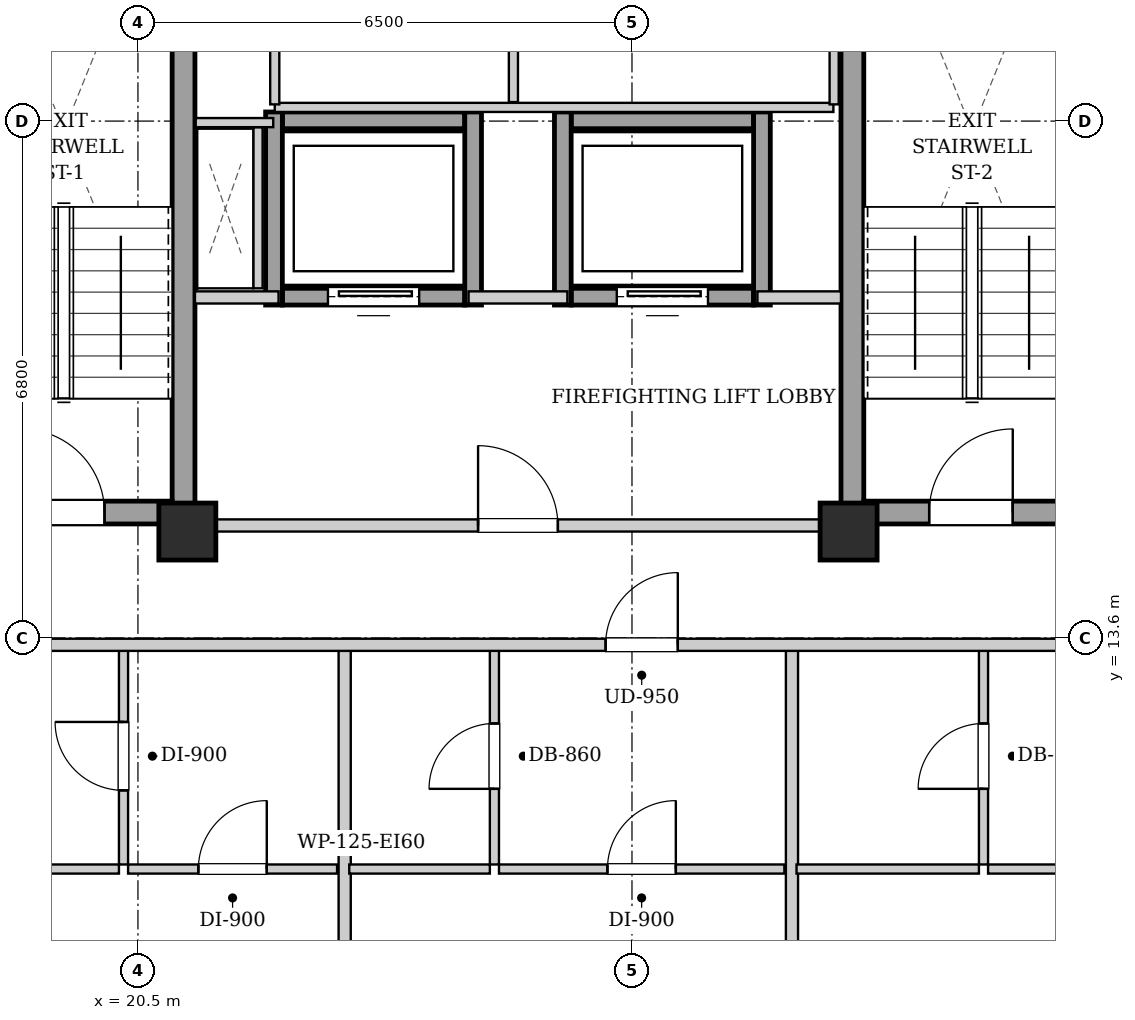
"""IFC4 building model, lengths in metres.
Left out: names, types, materials, properties, quantities, classifications, styles, units other than length and angle.
Written with IfcOpenShell. Run it as: python <this file> out.ifc"""

import sys

from ifc_helpers import new_model, si_unit, direction, frame, frame_2d, origin, origin_2d, place, context, subcontext, project, spatial, rectangle, extrude, element, fill, save


model = new_model("IFC4")
c1 = context("Model", 3, precision=1e-05, world=origin(), true_north=direction((0.0, 1.0)))
c2 = subcontext(c1, "Body", "Model", "MODEL_VIEW")
j1 = project(units=[si_unit("LENGTHUNIT", "METRE"), si_unit("PLANEANGLEUNIT", "RADIAN")], contexts=[c1])
p1 = place(None, origin())
s1 = spatial("IfcSite", under=j1, at=p1, CompositionType="ELEMENT")
p2 = place(p1, origin())
s2 = spatial("IfcBuilding", under=s1, at=p2, CompositionType="ELEMENT")
p3 = place(p2, frame((0.0, 0.0, 234.3)))
s3 = spatial("IfcBuildingStorey", under=s2, at=p3, CompositionType="ELEMENT", Elevation=234.3)
for number, where, z_axis, x_axis in (
    (1, (21.15, 15.0, 0.0), (0.0, 0.0, 1.0), (1.0, 0.0, 0.0)),
    (2, (29.85, 15.0, 0.0), (0.0, 0.0, 1.0), (1.0, 0.0, 0.0)),
):
    element("IfcColumn", number, at=place(p3, frame(where, z_axis=z_axis, x_axis=x_axis)), inside=s3, PredefinedType="COLUMN", context=c2, shape_type="SweptSolid", body=[
        extrude(rectangle(XDim=0.75, YDim=0.75, at=origin_2d()), origin(), (0.0, 0.0, 1.0), 3.4),
    ])
p4 = place(p3, frame((21.1, 15.1, 0.0), z_axis=(0.0, 0.0, 1.0), x_axis=(0.0, 1.0, 0.0)))
e3 = element("IfcWall", 3, at=p4, inside=s3, PredefinedType="SHEAR", context=c2, shape_type="SweptSolid", body=[
    extrude(rectangle(XDim=9.0, YDim=0.3, at=frame_2d((4.5, 0.0))), origin(), (0.0, 0.0, 1.0), 3.14),
])
p5 = place(p3, frame((18.1, 15.25, 0.0), z_axis=(0.0, 0.0, 1.0), x_axis=(1.0, 0.0, 0.0)))
e4 = element("IfcWall", 4, at=p5, inside=s3, PredefinedType="SHEAR", context=c2, shape_type="SweptSolid", body=[
    extrude(rectangle(XDim=2.85, YDim=0.3, at=frame_2d((1.425, 0.0))), origin(), (0.0, 0.0, 1.0), 3.14),
])
p6 = place(p5, frame((0.86, 0.0, 0.0)))
e5 = element("IfcOpeningElement", 5, at=p6, cuts=e4, PredefinedType="OPENING", context=c2, shape_type="SweptSolid", body=[
    extrude(rectangle(XDim=1.1, YDim=2.05, at=frame_2d((0.55, 1.025))), frame((0.0, 0.16, 0.0), z_axis=(0.0, -1.0, 0.0), x_axis=(1.0, 0.0, 0.0)), (0.0, 0.0, 1.0), 0.32),
])
p7 = place(p3, frame((29.9, 15.1, 0.0), z_axis=(0.0, 0.0, 1.0), x_axis=(0.0, 1.0, 0.0)))
e6 = element("IfcWall", 6, at=p7, inside=s3, PredefinedType="SHEAR", context=c2, shape_type="SweptSolid", body=[
    extrude(rectangle(XDim=9.0, YDim=0.3, at=frame_2d((4.5, 0.0))), origin(), (0.0, 0.0, 1.0), 3.14),
])
p8 = place(p3, frame((30.05, 15.25, 0.0), z_axis=(0.0, 0.0, 1.0), x_axis=(1.0, 0.0, 0.0)))
e7 = element("IfcWall", 7, at=p8, inside=s3, PredefinedType="SHEAR", context=c2, shape_type="SweptSolid", body=[
    extrude(rectangle(XDim=2.85, YDim=0.3, at=frame_2d((1.425, 0.0))), origin(), (0.0, 0.0, 1.0), 3.14),
])
p9 = place(p8, frame((0.86, 0.0, 0.0)))
e8 = element("IfcOpeningElement", 8, at=p9, cuts=e7, PredefinedType="OPENING", context=c2, shape_type="SweptSolid", body=[
    extrude(rectangle(XDim=1.1, YDim=2.05, at=frame_2d((0.55, 1.025))), frame((0.0, 0.16, 0.0), z_axis=(0.0, -1.0, 0.0), x_axis=(1.0, 0.0, 0.0)), (0.0, 0.0, 1.0), 0.32),
])
p10 = place(p3, frame((22.4, 18.09, 0.0), z_axis=(0.0, 0.0, 1.0), x_axis=(1.0, 0.0, 0.0)))
e9 = element("IfcWall", 9, at=p10, inside=s3, PredefinedType="SHEAR", context=c2, shape_type="SweptSolid", body=[
    extrude(rectangle(XDim=2.4, YDim=0.22, at=frame_2d((1.2, 0.0))), origin(), (0.0, 0.0, 1.0), 3.14),
])
p11 = place(p10, frame((0.6, 0.0, 0.0)))
e10 = element("IfcOpeningElement", 10, at=p11, cuts=e9, PredefinedType="OPENING", context=c2, shape_type="SweptSolid", body=[
    extrude(rectangle(XDim=1.2, YDim=2.15, at=frame_2d((0.6, 1.075))), frame((0.0, 0.12, 0.0), z_axis=(0.0, -1.0, 0.0), x_axis=(1.0, 0.0, 0.0)), (0.0, 0.0, 1.0), 0.24),
])
p12 = place(p3, frame((22.4, 20.41, 0.0), z_axis=(0.0, 0.0, 1.0), x_axis=(1.0, 0.0, 0.0)))
e11 = element("IfcWall", 11, at=p12, inside=s3, PredefinedType="SHEAR", context=c2, shape_type="SweptSolid", body=[
    extrude(rectangle(XDim=2.4, YDim=0.22, at=frame_2d((1.2, 0.0))), origin(), (0.0, 0.0, 1.0), 3.14),
])
for number, where, z_axis, x_axis in (
    (12, (22.29, 17.98, 0.0), (0.0, 0.0, 1.0), (0.0, 1.0, 0.0)),
    (13, (24.91, 17.98, 0.0), (0.0, 0.0, 1.0), (0.0, 1.0, 0.0)),
):
    element("IfcWall", number, at=place(p3, frame(where, z_axis=z_axis, x_axis=x_axis)), inside=s3, PredefinedType="SHEAR", context=c2, shape_type="SweptSolid", body=[
        extrude(rectangle(XDim=2.54, YDim=0.22, at=frame_2d((1.27, 0.0))), origin(), (0.0, 0.0, 1.0), 3.14),
    ])
p13 = place(p3, frame((26.2, 18.09, 0.0), z_axis=(0.0, 0.0, 1.0), x_axis=(1.0, 0.0, 0.0)))
e14 = element("IfcWall", 14, at=p13, inside=s3, PredefinedType="SHEAR", context=c2, shape_type="SweptSolid", body=[
    extrude(rectangle(XDim=2.4, YDim=0.22, at=frame_2d((1.2, 0.0))), origin(), (0.0, 0.0, 1.0), 3.14),
])
p14 = place(p13, frame((0.6, 0.0, 0.0)))
e15 = element("IfcOpeningElement", 15, at=p14, cuts=e14, PredefinedType="OPENING", context=c2, shape_type="SweptSolid", body=[
    extrude(rectangle(XDim=1.2, YDim=2.15, at=frame_2d((0.6, 1.075))), frame((0.0, 0.12, 0.0), z_axis=(0.0, -1.0, 0.0), x_axis=(1.0, 0.0, 0.0)), (0.0, 0.0, 1.0), 0.24),
])
p15 = place(p3, frame((26.2, 20.41, 0.0), z_axis=(0.0, 0.0, 1.0), x_axis=(1.0, 0.0, 0.0)))
e16 = element("IfcWall", 16, at=p15, inside=s3, PredefinedType="SHEAR", context=c2, shape_type="SweptSolid", body=[
    extrude(rectangle(XDim=2.4, YDim=0.22, at=frame_2d((1.2, 0.0))), origin(), (0.0, 0.0, 1.0), 3.14),
])
for number, where, z_axis, x_axis in (
    (17, (26.09, 17.98, 0.0), (0.0, 0.0, 1.0), (0.0, 1.0, 0.0)),
    (18, (28.71, 17.98, 0.0), (0.0, 0.0, 1.0), (0.0, 1.0, 0.0)),
):
    element("IfcWall", number, at=place(p3, frame(where, z_axis=z_axis, x_axis=x_axis)), inside=s3, PredefinedType="SHEAR", context=c2, shape_type="SweptSolid", body=[
        extrude(rectangle(XDim=2.54, YDim=0.22, at=frame_2d((1.27, 0.0))), origin(), (0.0, 0.0, 1.0), 3.14),
    ])
p16 = place(p3, frame((21.25, 15.08, 0.0), z_axis=(0.0, 0.0, 1.0), x_axis=(1.0, 0.0, 0.0)))
e19 = element("IfcWall", 19, at=p16, inside=s3, PredefinedType="PARTITIONING", context=c2, shape_type="SweptSolid", body=[
    extrude(rectangle(XDim=8.5, YDim=0.16, at=frame_2d((4.25, 0.0))), origin(), (0.0, 0.0, 1.0), 2.668),
])
p17 = place(p16, frame((3.725, 0.0, 0.0)))
e20 = element("IfcOpeningElement", 20, at=p17, cuts=e19, PredefinedType="OPENING", context=c2, shape_type="SweptSolid", body=[
    extrude(rectangle(XDim=1.05, YDim=2.05, at=frame_2d((0.525, 1.025))), frame((0.0, 0.09, 0.0), z_axis=(0.0, -1.0, 0.0), x_axis=(1.0, 0.0, 0.0)), (0.0, 0.0, 1.0), 0.18),
])
p18 = place(p3, frame((21.25, 18.08, 0.0), z_axis=(0.0, 0.0, 1.0), x_axis=(1.0, 0.0, 0.0)))
e21 = element("IfcWall", 21, at=p18, inside=s3, PredefinedType="PARTITIONING", context=c2, shape_type="SweptSolid", body=[
    extrude(rectangle(XDim=1.1, YDim=0.16, at=frame_2d((0.55, 0.0))), origin(), (0.0, 0.0, 1.0), 3.14),
])
p19 = place(p3, frame((24.85, 18.08, 0.0), z_axis=(0.0, 0.0, 1.0), x_axis=(1.0, 0.0, 0.0)))
e22 = element("IfcWall", 22, at=p19, inside=s3, PredefinedType="PARTITIONING", context=c2, shape_type="SweptSolid", body=[
    extrude(rectangle(XDim=1.3, YDim=0.16, at=frame_2d((0.65, 0.0))), origin(), (0.0, 0.0, 1.0), 3.14),
])
p20 = place(p3, frame((28.65, 18.08, 0.0), z_axis=(0.0, 0.0, 1.0), x_axis=(1.0, 0.0, 0.0)))
e23 = element("IfcWall", 23, at=p20, inside=s3, PredefinedType="PARTITIONING", context=c2, shape_type="SweptSolid", body=[
    extrude(rectangle(XDim=1.1, YDim=0.16, at=frame_2d((0.55, 0.0))), origin(), (0.0, 0.0, 1.0), 3.14),
])
p21 = place(p3, frame((22.08, 18.2, 0.0), z_axis=(0.0, 0.0, 1.0), x_axis=(0.0, 1.0, 0.0)))
e24 = element("IfcWall", 24, at=p21, inside=s3, PredefinedType="PARTITIONING", context=c2, shape_type="SweptSolid", body=[
    extrude(rectangle(XDim=2.12, YDim=0.12, at=frame_2d((1.06, 0.0))), origin(), (0.0, 0.0, 1.0), 3.14),
])
p22 = place(p3, frame((22.28, 20.38, 0.0), z_axis=(0.0, 0.0, 1.0), x_axis=(-1.0, 0.0, 0.0)))
e25 = element("IfcWall", 25, at=p22, inside=s3, PredefinedType="PARTITIONING", context=c2, shape_type="SweptSolid", body=[
    extrude(rectangle(XDim=1.02, YDim=0.12, at=frame_2d((0.51, 0.0))), origin(), (0.0, 0.0, 1.0), 3.14),
])
p23 = place(p3, frame((22.3, 20.58, 0.0), z_axis=(0.0, 0.0, 1.0), x_axis=(1.0, 0.0, 0.0)))
e26 = element("IfcWall", 26, at=p23, inside=s3, PredefinedType="PARTITIONING", context=c2, shape_type="SweptSolid", body=[
    extrude(rectangle(XDim=7.35, YDim=0.12, at=frame_2d((3.675, 0.0))), origin(), (0.0, 0.0, 1.0), 3.14),
])
for number, where, z_axis, x_axis in (
    (27, (22.3, 20.62, 0.0), (0.0, 0.0, 1.0), (0.0, 1.0, 0.0)),
    (28, (29.66, 20.62, 0.0), (0.0, 0.0, 1.0), (0.0, 1.0, 0.0)),
):
    element("IfcWall", number, at=place(p3, frame(where, z_axis=z_axis, x_axis=x_axis)), inside=s3, PredefinedType="PARTITIONING", context=c2, shape_type="SweptSolid", body=[
        extrude(rectangle(XDim=2.06, YDim=0.12, at=frame_2d((1.03, 0.0))), origin(), (0.0, 0.0, 1.0), 3.14),
    ])
p24 = place(p3, frame((25.44, 20.65, 0.0), z_axis=(0.0, 0.0, 1.0), x_axis=(0.0, 1.0, 0.0)))
e29 = element("IfcWall", 29, at=p24, inside=s3, PredefinedType="PARTITIONING", context=c2, shape_type="SweptSolid", body=[
    extrude(rectangle(XDim=2.0, YDim=0.12, at=frame_2d((1.0, 0.0))), origin(), (0.0, 0.0, 1.0), 3.14),
])
p25 = place(p3, frame((20.31, 10.62, 0.0), z_axis=(0.0, 0.0, 1.0), x_axis=(0.0, 1.0, 0.0)))
e30 = element("IfcWall", 30, at=p25, inside=s3, PredefinedType="PARTITIONING", context=c2, shape_type="SweptSolid", body=[
    extrude(rectangle(XDim=2.85, YDim=0.12, at=frame_2d((1.425, 0.0))), origin(), (0.0, 0.0, 1.0), 3.14),
])
p26 = place(p25, frame((0.975, 0.0, 0.0)))
e31 = element("IfcOpeningElement", 31, at=p26, cuts=e30, PredefinedType="OPENING", context=c2, shape_type="SweptSolid", body=[
    extrude(rectangle(XDim=0.9, YDim=2.05, at=frame_2d((0.45, 1.025))), frame((0.0, 0.07, 0.0), z_axis=(0.0, -1.0, 0.0), x_axis=(1.0, 0.0, 0.0)), (0.0, 0.0, 1.0), 0.14),
])
p27 = place(p3, frame((16.8, 10.56, 0.0), z_axis=(0.0, 0.0, 1.0), x_axis=(1.0, 0.0, 0.0)))
e32 = element("IfcWall", 32, at=p27, inside=s3, PredefinedType="PARTITIONING", context=c2, shape_type="SweptSolid", body=[
    extrude(rectangle(XDim=3.45, YDim=0.12, at=frame_2d((1.725, 0.0))), origin(), (0.0, 0.0, 1.0), 3.14),
])
p28 = place(p27, frame((1.275, 0.0, 0.0)))
e33 = element("IfcOpeningElement", 33, at=p28, cuts=e32, PredefinedType="OPENING", context=c2, shape_type="SweptSolid", body=[
    extrude(rectangle(XDim=0.9, YDim=2.05, at=frame_2d((0.45, 1.025))), frame((0.0, 0.07, 0.0), z_axis=(0.0, -1.0, 0.0), x_axis=(1.0, 0.0, 0.0)), (0.0, 0.0, 1.0), 0.14),
])
p29 = place(p3, frame((20.37, 10.56, 0.0), z_axis=(0.0, 0.0, 1.0), x_axis=(1.0, 0.0, 0.0)))
e34 = element("IfcWall", 34, at=p29, inside=s3, PredefinedType="PARTITIONING", context=c2, shape_type="SweptSolid", body=[
    extrude(rectangle(XDim=2.75, YDim=0.12, at=frame_2d((1.375, 0.0))), origin(), (0.0, 0.0, 1.0), 3.14),
])
p30 = place(p29, frame((0.925, 0.0, 0.0)))
e35 = element("IfcOpeningElement", 35, at=p30, cuts=e34, PredefinedType="OPENING", context=c2, shape_type="SweptSolid", body=[
    extrude(rectangle(XDim=0.9, YDim=2.05, at=frame_2d((0.45, 1.025))), frame((0.0, 0.07, 0.0), z_axis=(0.0, -1.0, 0.0), x_axis=(1.0, 0.0, 0.0)), (0.0, 0.0, 1.0), 0.14),
])
p31 = place(p3, frame((23.22, 4.08, 0.0), z_axis=(0.0, 0.0, 1.0), x_axis=(0.0, 1.0, 0.0)))
e36 = element("IfcWall", 36, at=p31, inside=s3, PredefinedType="PARTITIONING", context=c2, shape_type="SweptSolid", body=[
    extrude(rectangle(XDim=9.39, YDim=0.16, at=frame_2d((4.695, 0.0))), origin(), (0.0, 0.0, 1.0), 3.14),
])
p32 = place(p3, frame((25.19, 10.62, 0.0), z_axis=(0.0, 0.0, 1.0), x_axis=(0.0, 1.0, 0.0)))
e37 = element("IfcWall", 37, at=p32, inside=s3, PredefinedType="PARTITIONING", context=c2, shape_type="SweptSolid", body=[
    extrude(rectangle(XDim=2.85, YDim=0.12, at=frame_2d((1.425, 0.0))), origin(), (0.0, 0.0, 1.0), 3.14),
])
p33 = place(p32, frame((0.995, 0.0, 0.0)))
e38 = element("IfcOpeningElement", 38, at=p33, cuts=e37, PredefinedType="OPENING", context=c2, shape_type="SweptSolid", body=[
    extrude(rectangle(XDim=0.86, YDim=2.05, at=frame_2d((0.43, 1.025))), frame((0.0, 0.07, 0.0), z_axis=(0.0, -1.0, 0.0), x_axis=(1.0, 0.0, 0.0)), (0.0, 0.0, 1.0), 0.14),
])
p34 = place(p3, frame((23.28, 10.56, 0.0), z_axis=(0.0, 0.0, 1.0), x_axis=(1.0, 0.0, 0.0)))
e39 = element("IfcWall", 39, at=p34, inside=s3, PredefinedType="PARTITIONING", context=c2, shape_type="SweptSolid", body=[
    extrude(rectangle(XDim=1.85, YDim=0.12, at=frame_2d((0.925, 0.0))), origin(), (0.0, 0.0, 1.0), 3.14),
])
p35 = place(p3, frame((25.25, 10.56, 0.0), z_axis=(0.0, 0.0, 1.0), x_axis=(1.0, 0.0, 0.0)))
e40 = element("IfcWall", 40, at=p35, inside=s3, PredefinedType="PARTITIONING", context=c2, shape_type="SweptSolid", body=[
    extrude(rectangle(XDim=3.755, YDim=0.12, at=frame_2d((1.877, 0.0))), origin(), (0.0, 0.0, 1.0), 3.14),
])
p36 = place(p35, frame((1.427, 0.0, 0.0)))
e41 = element("IfcOpeningElement", 41, at=p36, cuts=e40, PredefinedType="OPENING", context=c2, shape_type="SweptSolid", body=[
    extrude(rectangle(XDim=0.9, YDim=2.05, at=frame_2d((0.45, 1.025))), frame((0.0, 0.07, 0.0), z_axis=(0.0, -1.0, 0.0), x_axis=(1.0, 0.0, 0.0)), (0.0, 0.0, 1.0), 0.14),
])
p37 = place(p3, frame((29.105, 4.08, 0.0), z_axis=(0.0, 0.0, 1.0), x_axis=(0.0, 1.0, 0.0)))
e42 = element("IfcWall", 42, at=p37, inside=s3, PredefinedType="PARTITIONING", context=c2, shape_type="SweptSolid", body=[
    extrude(rectangle(XDim=9.39, YDim=0.16, at=frame_2d((4.695, 0.0))), origin(), (0.0, 0.0, 1.0), 3.14),
])
p38 = place(p3, frame((31.625, 10.62, 0.0), z_axis=(0.0, 0.0, 1.0), x_axis=(0.0, 1.0, 0.0)))
e43 = element("IfcWall", 43, at=p38, inside=s3, PredefinedType="PARTITIONING", context=c2, shape_type="SweptSolid", body=[
    extrude(rectangle(XDim=2.85, YDim=0.12, at=frame_2d((1.425, 0.0))), origin(), (0.0, 0.0, 1.0), 3.14),
])
p39 = place(p38, frame((0.995, 0.0, 0.0)))
e44 = element("IfcOpeningElement", 44, at=p39, cuts=e43, PredefinedType="OPENING", context=c2, shape_type="SweptSolid", body=[
    extrude(rectangle(XDim=0.86, YDim=2.05, at=frame_2d((0.43, 1.025))), frame((0.0, 0.07, 0.0), z_axis=(0.0, -1.0, 0.0), x_axis=(1.0, 0.0, 0.0)), (0.0, 0.0, 1.0), 0.14),
])
p40 = place(p3, frame((29.165, 10.56, 0.0), z_axis=(0.0, 0.0, 1.0), x_axis=(1.0, 0.0, 0.0)))
e45 = element("IfcWall", 45, at=p40, inside=s3, PredefinedType="PARTITIONING", context=c2, shape_type="SweptSolid", body=[
    extrude(rectangle(XDim=2.4, YDim=0.12, at=frame_2d((1.2, 0.0))), origin(), (0.0, 0.0, 1.0), 3.14),
])
p41 = place(p3, frame((31.685, 10.56, 0.0), z_axis=(0.0, 0.0, 1.0), x_axis=(1.0, 0.0, 0.0)))
e46 = element("IfcWall", 46, at=p41, inside=s3, PredefinedType="PARTITIONING", context=c2, shape_type="SweptSolid", body=[
    extrude(rectangle(XDim=3.45, YDim=0.12, at=frame_2d((1.725, 0.0))), origin(), (0.0, 0.0, 1.0), 3.14),
])
p42 = place(p41, frame((1.275, 0.0, 0.0)))
e47 = element("IfcOpeningElement", 47, at=p42, cuts=e46, PredefinedType="OPENING", context=c2, shape_type="SweptSolid", body=[
    extrude(rectangle(XDim=0.9, YDim=2.05, at=frame_2d((0.45, 1.025))), frame((0.0, 0.07, 0.0), z_axis=(0.0, -1.0, 0.0), x_axis=(1.0, 0.0, 0.0)), (0.0, 0.0, 1.0), 0.14),
])
p43 = place(p3, frame((13.15, 13.51, 0.0), z_axis=(0.0, 0.0, 1.0), x_axis=(1.0, 0.0, 0.0)))
e48 = element("IfcWall", 48, at=p43, inside=s3, PredefinedType="PARTITIONING", context=c2, shape_type="SweptSolid", body=[
    extrude(rectangle(XDim=24.6, YDim=0.16, at=frame_2d((12.3, 0.0))), origin(), (0.0, 0.0, 1.0), 3.14),
])
p44 = place(p43, frame((5.185, 0.0, 0.0)))
e49 = element("IfcOpeningElement", 49, at=p44, cuts=e48, PredefinedType="OPENING", context=c2, shape_type="SweptSolid", body=[
    extrude(rectangle(XDim=0.95, YDim=2.1, at=frame_2d((0.475, 1.05))), frame((0.0, 0.09, 0.0), z_axis=(0.0, -1.0, 0.0), x_axis=(1.0, 0.0, 0.0)), (0.0, 0.0, 1.0), 0.18),
])
p45 = place(p43, frame((13.503, 0.0, 0.0)))
e50 = element("IfcOpeningElement", 50, at=p45, cuts=e48, PredefinedType="OPENING", context=c2, shape_type="SweptSolid", body=[
    extrude(rectangle(XDim=0.95, YDim=2.1, at=frame_2d((0.475, 1.05))), frame((0.0, 0.09, 0.0), z_axis=(0.0, -1.0, 0.0), x_axis=(1.0, 0.0, 0.0)), (0.0, 0.0, 1.0), 0.18),
])
p46 = place(p43, frame((20.585, 0.0, 0.0)))
e51 = element("IfcOpeningElement", 51, at=p46, cuts=e48, PredefinedType="OPENING", context=c2, shape_type="SweptSolid", body=[
    extrude(rectangle(XDim=0.95, YDim=2.1, at=frame_2d((0.475, 1.05))), frame((0.0, 0.09, 0.0), z_axis=(0.0, -1.0, 0.0), x_axis=(1.0, 0.0, 0.0)), (0.0, 0.0, 1.0), 0.18),
])
p47 = place(p6, origin())
e52 = element("IfcDoor", 52, at=p47, inside=s3, OperationType="SINGLE_SWING_LEFT", PredefinedType="DOOR", context=c2, shape_type="SweptSolid", body=[
    extrude(rectangle(XDim=1.1, YDim=2.05, at=frame_2d((0.55, 1.025))), frame((0.0, 0.025, 0.0), z_axis=(0.0, -1.0, 0.0), x_axis=(1.0, 0.0, 0.0)), (0.0, 0.0, 1.0), 0.05),
])
fill(e5, e52)
p48 = place(p9, origin())
e53 = element("IfcDoor", 53, at=p48, inside=s3, OperationType="SINGLE_SWING_RIGHT", PredefinedType="DOOR", context=c2, shape_type="SweptSolid", body=[
    extrude(rectangle(XDim=1.1, YDim=2.05, at=frame_2d((0.55, 1.025))), frame((0.0, 0.025, 0.0), z_axis=(0.0, -1.0, 0.0), x_axis=(1.0, 0.0, 0.0)), (0.0, 0.0, 1.0), 0.05),
])
fill(e8, e53)
p49 = place(p11, origin())
e54 = element("IfcDoor", 54, at=p49, inside=s3, OperationType="SLIDING_TO_LEFT", PredefinedType="DOOR", context=c2, shape_type="SweptSolid", body=[
    extrude(rectangle(XDim=1.2, YDim=2.15, at=frame_2d((0.6, 1.075))), frame((0.0, 0.025, 0.0), z_axis=(0.0, -1.0, 0.0), x_axis=(1.0, 0.0, 0.0)), (0.0, 0.0, 1.0), 0.05),
])
fill(e10, e54)
p50 = place(p14, origin())
e55 = element("IfcDoor", 55, at=p50, inside=s3, OperationType="SLIDING_TO_LEFT", PredefinedType="DOOR", context=c2, shape_type="SweptSolid", body=[
    extrude(rectangle(XDim=1.2, YDim=2.15, at=frame_2d((0.6, 1.075))), frame((0.0, 0.025, 0.0), z_axis=(0.0, -1.0, 0.0), x_axis=(1.0, 0.0, 0.0)), (0.0, 0.0, 1.0), 0.05),
])
fill(e15, e55)
p51 = place(p17, origin())
e56 = element("IfcDoor", 56, at=p51, inside=s3, OperationType="SINGLE_SWING_LEFT", PredefinedType="DOOR", context=c2, shape_type="SweptSolid", body=[
    extrude(rectangle(XDim=1.05, YDim=2.05, at=frame_2d((0.525, 1.025))), frame((0.0, 0.025, 0.0), z_axis=(0.0, -1.0, 0.0), x_axis=(1.0, 0.0, 0.0)), (0.0, 0.0, 1.0), 0.05),
])
fill(e20, e56)
p52 = place(p26, origin())
e57 = element("IfcDoor", 57, at=p52, inside=s3, OperationType="SINGLE_SWING_RIGHT", PredefinedType="DOOR", context=c2, shape_type="SweptSolid", body=[
    extrude(rectangle(XDim=0.9, YDim=2.05, at=frame_2d((0.45, 1.025))), frame((0.0, 0.025, 0.0), z_axis=(0.0, -1.0, 0.0), x_axis=(1.0, 0.0, 0.0)), (0.0, 0.0, 1.0), 0.05),
])
fill(e31, e57)
p53 = place(p30, origin())
e58 = element("IfcDoor", 58, at=p53, inside=s3, OperationType="SINGLE_SWING_RIGHT", PredefinedType="DOOR", context=c2, shape_type="SweptSolid", body=[
    extrude(rectangle(XDim=0.9, YDim=2.05, at=frame_2d((0.45, 1.025))), frame((0.0, 0.025, 0.0), z_axis=(0.0, -1.0, 0.0), x_axis=(1.0, 0.0, 0.0)), (0.0, 0.0, 1.0), 0.05),
])
fill(e35, e58)
p54 = place(p33, origin())
e59 = element("IfcDoor", 59, at=p54, inside=s3, OperationType="SINGLE_SWING_LEFT", PredefinedType="DOOR", context=c2, shape_type="SweptSolid", body=[
    extrude(rectangle(XDim=0.86, YDim=2.05, at=frame_2d((0.43, 1.025))), frame((0.0, 0.025, 0.0), z_axis=(0.0, -1.0, 0.0), x_axis=(1.0, 0.0, 0.0)), (0.0, 0.0, 1.0), 0.05),
])
fill(e38, e59)
p55 = place(p36, origin())
e60 = element("IfcDoor", 60, at=p55, inside=s3, OperationType="SINGLE_SWING_RIGHT", PredefinedType="DOOR", context=c2, shape_type="SweptSolid", body=[
    extrude(rectangle(XDim=0.9, YDim=2.05, at=frame_2d((0.45, 1.025))), frame((0.0, 0.025, 0.0), z_axis=(0.0, -1.0, 0.0), x_axis=(1.0, 0.0, 0.0)), (0.0, 0.0, 1.0), 0.05),
])
fill(e41, e60)
p56 = place(p39, origin())
e61 = element("IfcDoor", 61, at=p56, inside=s3, OperationType="SINGLE_SWING_LEFT", PredefinedType="DOOR", context=c2, shape_type="SweptSolid", body=[
    extrude(rectangle(XDim=0.86, YDim=2.05, at=frame_2d((0.43, 1.025))), frame((0.0, 0.025, 0.0), z_axis=(0.0, -1.0, 0.0), x_axis=(1.0, 0.0, 0.0)), (0.0, 0.0, 1.0), 0.05),
])
fill(e44, e61)
p57 = place(p45, origin())
e62 = element("IfcDoor", 62, at=p57, inside=s3, OperationType="SINGLE_SWING_RIGHT", PredefinedType="DOOR", context=c2, shape_type="SweptSolid", body=[
    extrude(rectangle(XDim=0.95, YDim=2.1, at=frame_2d((0.475, 1.05))), frame((0.0, 0.025, 0.0), z_axis=(0.0, -1.0, 0.0), x_axis=(1.0, 0.0, 0.0)), (0.0, 0.0, 1.0), 0.05),
])
fill(e50, e62)
save(model, sys.argv[1])
